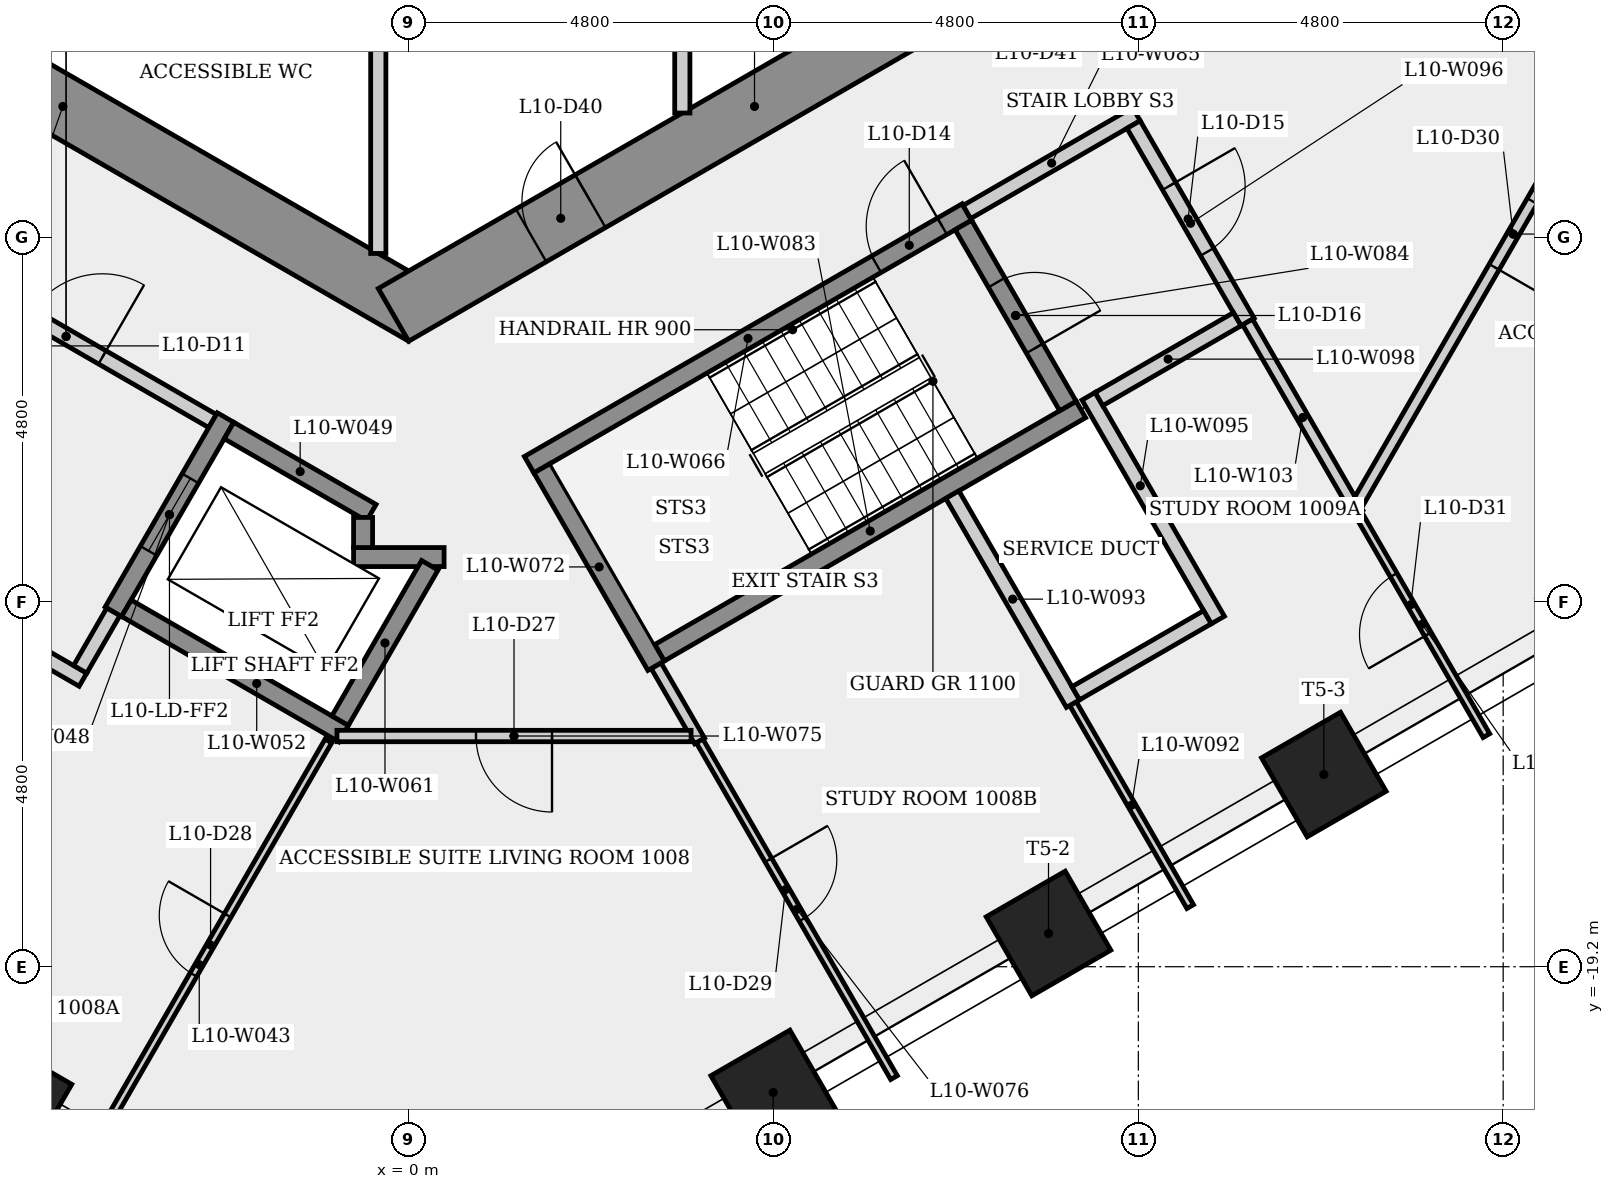
"""IFC4 building model, lengths in metres.
Left out: names, types, materials, properties, quantities, classifications, styles, units other than length and angle.
Written with IfcOpenShell. Run it as: python <this file> out.ifc"""

import sys

from ifc_helpers import new_model, si_unit, direction, frame, frame_2d, origin, origin_2d, place, context, subcontext, project, spatial, rectangle, extrude, element, fill, save


model = new_model("IFC4")
c1 = context("Model", 3, precision=1e-05, world=origin(), true_north=direction((0.0, 1.0)))
c2 = subcontext(c1, "Body", "Model", "MODEL_VIEW")
j1 = project(units=[si_unit("LENGTHUNIT", "METRE"), si_unit("PLANEANGLEUNIT", "RADIAN")], contexts=[c1])
p1 = place(None, origin())
s1 = spatial("IfcSite", under=j1, at=p1, CompositionType="ELEMENT")
p2 = place(p1, origin())
s2 = spatial("IfcBuilding", under=s1, at=p2, CompositionType="ELEMENT")
p3 = place(p2, frame((0.0, 0.0, 42.5)))
s3 = spatial("IfcBuildingStorey", under=s2, at=p3, CompositionType="ELEMENT", Elevation=42.5)
p4 = place(p3, frame((-9.3, -5.138, 0.0), z_axis=(0.0, 0.0, 1.0), x_axis=(0.866023993627, -0.500002442456, 0.0)))
e1 = element("IfcWall", 1, at=p4, inside=s3, PredefinedType="SHEAR", context=c2, shape_type="SweptSolid", body=[
    extrude(rectangle(XDim=10.97, YDim=0.8, at=frame_2d((5.485, 0.0))), origin(), (0.0, 0.0, 1.0), 3.4),
])
p5 = place(p4, frame((3.192, 0.0, 0.0)))
e2 = element("IfcOpeningElement", 2, at=p5, cuts=e1, PredefinedType="OPENING", context=c2, shape_type="SweptSolid", body=[
    extrude(rectangle(XDim=0.9, YDim=2.1, at=frame_2d((0.45, 1.05))), frame((0.0, 0.41, 0.0), z_axis=(0.0, -1.0, 0.0), x_axis=(1.0, 0.0, 0.0)), (0.0, 0.0, 1.0), 0.82),
])
p6 = place(p3, frame((-0.2, -10.623, 0.0), z_axis=(0.0, 0.0, 1.0), x_axis=(0.866023993627, 0.500002442456, 0.0)))
e3 = element("IfcWall", 3, at=p6, inside=s3, PredefinedType="SHEAR", context=c2, shape_type="SweptSolid", body=[
    extrude(rectangle(XDim=10.97, YDim=0.8, at=frame_2d((5.485, 0.0))), origin(), (0.0, 0.0, 1.0), 3.4),
])
p7 = place(p6, frame((2.091, 0.0, 0.0)))
e4 = element("IfcOpeningElement", 4, at=p7, cuts=e3, PredefinedType="OPENING", context=c2, shape_type="SweptSolid", body=[
    extrude(rectangle(XDim=0.9, YDim=2.1, at=frame_2d((0.45, 1.05))), frame((0.0, 0.41, 0.0), z_axis=(0.0, -1.0, 0.0), x_axis=(1.0, 0.0, 0.0)), (0.0, 0.0, 1.0), 0.82),
])
p8 = place(p6, frame((9.325, 0.0, 0.0)))
e5 = element("IfcOpeningElement", 5, at=p8, cuts=e3, PredefinedType="OPENING", context=c2, shape_type="SweptSolid", body=[
    extrude(rectangle(XDim=0.9, YDim=2.1, at=frame_2d((0.45, 1.05))), frame((0.0, 0.41, 0.0), z_axis=(0.0, -1.0, 0.0), x_axis=(1.0, 0.0, 0.0)), (0.0, 0.0, 1.0), 0.82),
])
for number, where, z_axis, x_axis in (
    (6, (-5.253, -20.967, 0.0), (0.0, 0.0, 1.0), (-0.5, -0.866, 0.0)),
    (7, (4.796, -20.854, 0.0), (0.0, 0.0, 1.0), (0.5, -0.866, 0.0)),
    (8, (8.418, -18.763, 0.0), (0.0, 0.0, 1.0), (0.5, -0.866, 0.0)),
    (9, (12.04, -16.672, 0.0), (0.0, 0.0, 1.0), (0.5, -0.866, 0.0)),
):
    element("IfcColumn", number, at=place(p3, frame(where, z_axis=z_axis, x_axis=x_axis)), inside=s3, PredefinedType="COLUMN", context=c2, shape_type="SweptSolid", body=[
        extrude(rectangle(XDim=1.2, YDim=1.2, at=origin_2d()), origin(), (0.0, 0.0, 1.0), 3.4),
    ])
p9 = place(p3, frame((-8.356, -13.073, 0.0), z_axis=(0.0, 0.0, 1.0), x_axis=(0.866038532462, -0.499977259774, 0.0)))
e10 = element("IfcWall", 10, at=p9, inside=s3, PredefinedType="PARTITIONING", context=c2, shape_type="SweptSolid", body=[
    extrude(rectangle(XDim=4.7, YDim=0.2, at=frame_2d((2.35, 0.0))), origin(), (0.0, 0.0, 1.0), 3.05),
])
p10 = place(p3, frame((-6.435, -9.795, 0.0), z_axis=(0.0, 0.0, 1.0), x_axis=(0.866012907634, -0.500021643343, 0.0)))
e11 = element("IfcWall", 11, at=p10, inside=s3, PredefinedType="PARTITIONING", context=c2, shape_type="SweptSolid", body=[
    extrude(rectangle(XDim=4.45, YDim=0.2, at=frame_2d((2.225, 0.0))), origin(), (0.0, 0.0, 1.0), 3.05),
])
p11 = place(p10, frame((1.675, 0.0, 0.0)))
e12 = element("IfcOpeningElement", 12, at=p11, cuts=e11, PredefinedType="OPENING", context=c2, shape_type="SweptSolid", body=[
    extrude(rectangle(XDim=1.1, YDim=2.1, at=frame_2d((0.55, 1.05))), frame((0.0, 0.11, 0.0), z_axis=(0.0, -1.0, 0.0), x_axis=(1.0, 0.0, 0.0)), (0.0, 0.0, 1.0), 0.22),
])
p12 = place(p3, frame((-4.455, -22.116, 0.0), z_axis=(0.0, 0.0, 1.0), x_axis=(0.499971184285, 0.866042039906, 0.0)))
e13 = element("IfcWall", 13, at=p12, inside=s3, PredefinedType="PARTITIONING", context=c2, shape_type="SweptSolid", body=[
    extrude(rectangle(XDim=6.797, YDim=0.1, at=frame_2d((3.399, 0.0))), origin(), (0.0, 0.0, 1.0), 3.05),
])
p13 = place(p12, frame((3.247, 0.0, 0.0)))
e14 = element("IfcOpeningElement", 14, at=p13, cuts=e13, PredefinedType="OPENING", context=c2, shape_type="SweptSolid", body=[
    extrude(rectangle(XDim=0.9, YDim=2.1, at=frame_2d((0.45, 1.05))), frame((0.0, 0.06, 0.0), z_axis=(0.0, -1.0, 0.0), x_axis=(1.0, 0.0, 0.0)), (0.0, 0.0, 1.0), 0.12),
])
p14 = place(p3, frame((-3.885, -14.529, 0.0), z_axis=(0.0, 0.0, 1.0), x_axis=(-0.499859285417, -0.866106630146, 0.0)))
e15 = element("IfcWall", 15, at=p14, inside=s3, PredefinedType="PARTITIONING", context=c2, shape_type="SweptSolid", body=[
    extrude(rectangle(XDim=0.875, YDim=0.2, at=frame_2d((0.438, 0.0))), origin(), (0.0, 0.0, 1.0), 3.05),
])
p15 = place(p3, frame((-2.41, -11.974, 0.0), z_axis=(0.0, 0.0, 1.0), x_axis=(-0.500001826776, -0.866024349092, 0.0)))
e16 = element("IfcWall", 16, at=p15, inside=s3, PredefinedType="SHEAR", context=c2, shape_type="SweptSolid", body=[
    extrude(rectangle(XDim=2.95, YDim=0.25, at=frame_2d((1.475, 0.0))), origin(), (0.0, 0.0, 1.0), 3.05),
])
p16 = place(p15, frame((0.925, 0.0, 0.0)))
e17 = element("IfcOpeningElement", 17, at=p16, cuts=e16, PredefinedType="OPENING", context=c2, shape_type="SweptSolid", body=[
    extrude(rectangle(XDim=1.1, YDim=2.1, at=frame_2d((0.55, 1.05))), frame((0.0, 0.135, 0.0), z_axis=(0.0, -1.0, 0.0), x_axis=(1.0, 0.0, 0.0)), (0.0, 0.0, 1.0), 0.27),
])
p17 = place(p3, frame((-2.364, -12.145, 0.0), z_axis=(0.0, 0.0, 1.0), x_axis=(0.86603892542, -0.499976579108, 0.0)))
e18 = element("IfcWall", 18, at=p17, inside=s3, PredefinedType="SHEAR", context=c2, shape_type="SweptSolid", body=[
    extrude(rectangle(XDim=2.162, YDim=0.25, at=frame_2d((1.081, 0.0))), origin(), (0.0, 0.0, 1.0), 3.05),
])
p18 = place(p3, frame((-0.856, -16.133, 0.0), z_axis=(0.0, 0.0, 1.0), x_axis=(-0.866021716278, 0.500006386895, 0.0)))
e19 = element("IfcWall", 19, at=p18, inside=s3, PredefinedType="SHEAR", context=c2, shape_type="SweptSolid", body=[
    extrude(rectangle(XDim=3.3, YDim=0.25, at=frame_2d((1.65, 0.0))), origin(), (0.0, 0.0, 1.0), 3.05),
])
p19 = place(p3, frame((-0.725, -13.81, 0.0), z_axis=(0.0, 0.0, 1.0), x_axis=(1.0, 0.0, 0.0)))
e20 = element("IfcWall", 20, at=p19, inside=s3, PredefinedType="SHEAR", context=c2, shape_type="SweptSolid", body=[
    extrude(rectangle(XDim=1.191, YDim=0.25, at=frame_2d((0.595, 0.0))), origin(), (0.0, 0.0, 1.0), 3.05),
])
p20 = place(p3, frame((-0.6, -13.289, 0.0), z_axis=(0.0, 0.0, 1.0), x_axis=(0.0, -1.0, 0.0)))
e21 = element("IfcWall", 21, at=p20, inside=s3, PredefinedType="SHEAR", context=c2, shape_type="SweptSolid", body=[
    extrude(rectangle(XDim=0.396, YDim=0.25, at=frame_2d((0.198, 0.0))), origin(), (0.0, 0.0, 1.0), 3.4),
])
p21 = place(p3, frame((-0.4, -5.275, 0.0), z_axis=(0.0, 0.0, 1.0), x_axis=(0.0, -1.0, 0.0)))
e22 = element("IfcWall", 22, at=p21, inside=s3, PredefinedType="PARTITIONING", context=c2, shape_type="SweptSolid", body=[
    extrude(rectangle(XDim=4.54, YDim=0.2, at=frame_2d((2.27, 0.0))), origin(), (0.0, 0.0, 1.0), 3.05),
])
p22 = place(p3, frame((0.278, -13.918, 0.0), z_axis=(0.0, 0.0, 1.0), x_axis=(-0.49998806882, -0.866032292145, 0.0)))
e23 = element("IfcWall", 23, at=p22, inside=s3, PredefinedType="SHEAR", context=c2, shape_type="SweptSolid", body=[
    extrude(rectangle(XDim=2.36, YDim=0.25, at=frame_2d((1.18, 0.0))), origin(), (0.0, 0.0, 1.0), 3.4),
])
p23 = place(p3, frame((1.585, -12.595, 0.0), z_axis=(0.0, 0.0, 1.0), x_axis=(0.866036417653, 0.499980922934, 0.0)))
e24 = element("IfcWall", 24, at=p23, inside=s3, PredefinedType="SHEAR", context=c2, shape_type="SweptSolid", body=[
    extrude(rectangle(XDim=6.65, YDim=0.25, at=frame_2d((3.325, 0.0))), origin(), (0.0, 0.0, 1.0), 3.05),
])
p24 = place(p23, frame((5.275, 0.0, 0.0)))
e25 = element("IfcOpeningElement", 25, at=p24, cuts=e24, PredefinedType="OPENING", context=c2, shape_type="SweptSolid", body=[
    extrude(rectangle(XDim=1.0, YDim=2.1, at=frame_2d((0.5, 1.05))), frame((0.0, 0.135, 0.0), z_axis=(0.0, -1.0, 0.0), x_axis=(1.0, 0.0, 0.0)), (0.0, 0.0, 1.0), 0.27),
])
p25 = place(p3, frame((3.256, -15.239, 0.0), z_axis=(0.0, 0.0, 1.0), x_axis=(0.500018023529, -0.866014997645, 0.0)))
e26 = element("IfcWall", 26, at=p25, inside=s3, PredefinedType="PARTITIONING", context=c2, shape_type="SweptSolid", body=[
    extrude(rectangle(XDim=1.144, YDim=0.15, at=frame_2d((0.572, 0.0))), origin(), (0.0, 0.0, 1.0), 3.05),
])
p26 = place(p3, frame((3.256, -15.239, 0.0), z_axis=(0.0, 0.0, 1.0), x_axis=(-0.50002537861, 0.866010750942, 0.0)))
e27 = element("IfcWall", 27, at=p26, inside=s3, PredefinedType="SHEAR", context=c2, shape_type="SweptSolid", body=[
    extrude(rectangle(XDim=3.0, YDim=0.25, at=frame_2d((1.5, 0.0))), origin(), (0.0, 0.0, 1.0), 3.05),
])
p27 = place(p3, frame((3.6, -5.275, 0.0), z_axis=(0.0, 0.0, 1.0), x_axis=(0.0, -1.0, 0.0)))
e28 = element("IfcWall", 28, at=p27, inside=s3, PredefinedType="PARTITIONING", context=c2, shape_type="SweptSolid", body=[
    extrude(rectangle(XDim=2.692, YDim=0.2, at=frame_2d((1.346, 0.0))), origin(), (0.0, 0.0, 1.0), 3.05),
])
p28 = place(p3, frame((3.715, -16.165, 0.0), z_axis=(0.0, 0.0, 1.0), x_axis=(-1.0, 0.0, 0.0)))
e29 = element("IfcWall", 29, at=p28, inside=s3, PredefinedType="PARTITIONING", context=c2, shape_type="SweptSolid", body=[
    extrude(rectangle(XDim=4.659, YDim=0.15, at=frame_2d((2.33, 0.0))), origin(), (0.0, 0.0, 1.0), 3.05),
])
p29 = place(p28, frame((1.829, 0.0, 0.0)))
e30 = element("IfcOpeningElement", 30, at=p29, cuts=e29, PredefinedType="OPENING", context=c2, shape_type="SweptSolid", body=[
    extrude(rectangle(XDim=1.0, YDim=2.1, at=frame_2d((0.5, 1.05))), frame((0.0, 0.085, 0.0), z_axis=(0.0, -1.0, 0.0), x_axis=(1.0, 0.0, 0.0)), (0.0, 0.0, 1.0), 0.17),
])
p30 = place(p3, frame((3.828, -16.229, 0.0), z_axis=(0.0, 0.0, 1.0), x_axis=(0.499984131058, -0.866034565529, 0.0)))
e31 = element("IfcWall", 31, at=p30, inside=s3, PredefinedType="PARTITIONING", context=c2, shape_type="SweptSolid", body=[
    extrude(rectangle(XDim=5.115, YDim=0.1, at=frame_2d((2.558, 0.0))), origin(), (0.0, 0.0, 1.0), 3.05),
])
p31 = place(p30, frame((1.81, 0.0, 0.0)))
e32 = element("IfcOpeningElement", 32, at=p31, cuts=e31, PredefinedType="OPENING", context=c2, shape_type="SweptSolid", body=[
    extrude(rectangle(XDim=0.9, YDim=2.1, at=frame_2d((0.45, 1.05))), frame((0.0, 0.06, 0.0), z_axis=(0.0, -1.0, 0.0), x_axis=(1.0, 0.0, 0.0)), (0.0, 0.0, 1.0), 0.12),
])
p32 = place(p3, frame((3.301, -15.068, 0.0), z_axis=(0.0, 0.0, 1.0), x_axis=(0.866035036182, 0.499983315828, 0.0)))
e33 = element("IfcWall", 33, at=p32, inside=s3, PredefinedType="SHEAR", context=c2, shape_type="SweptSolid", body=[
    extrude(rectangle(XDim=6.4, YDim=0.25, at=frame_2d((3.2, 0.0))), origin(), (0.0, 0.0, 1.0), 3.05),
])
p33 = place(p3, frame((7.298, -9.441, 0.0), z_axis=(0.0, 0.0, 1.0), x_axis=(0.500034990121, -0.866005201286, 0.0)))
e34 = element("IfcWall", 34, at=p33, inside=s3, PredefinedType="SHEAR", context=c2, shape_type="SweptSolid", body=[
    extrude(rectangle(XDim=2.75, YDim=0.25, at=frame_2d((1.375, 0.0))), origin(), (0.0, 0.0, 1.0), 3.05),
])
p34 = place(p33, frame((0.875, 0.0, 0.0)))
e35 = element("IfcOpeningElement", 35, at=p34, cuts=e34, PredefinedType="OPENING", context=c2, shape_type="SweptSolid", body=[
    extrude(rectangle(XDim=1.0, YDim=2.1, at=frame_2d((0.5, 1.05))), frame((0.0, 0.135, 0.0), z_axis=(0.0, -1.0, 0.0), x_axis=(1.0, 0.0, 0.0)), (0.0, 0.0, 1.0), 0.27),
])
p35 = place(p3, frame((7.344, -9.27, 0.0), z_axis=(0.0, 0.0, 1.0), x_axis=(0.866005588531, 0.500034319456, 0.0)))
e36 = element("IfcWall", 36, at=p35, inside=s3, PredefinedType="PARTITIONING", context=c2, shape_type="SweptSolid", body=[
    extrude(rectangle(XDim=2.575, YDim=0.2, at=frame_2d((1.288, 0.0))), origin(), (0.0, 0.0, 1.0), 3.05),
])
p36 = place(p3, frame((8.74, -15.738, 0.0), z_axis=(0.0, 0.0, 1.0), x_axis=(0.499987416453, -0.866032668777, 0.0)))
e37 = element("IfcWall", 37, at=p36, inside=s3, PredefinedType="PARTITIONING", context=c2, shape_type="SweptSolid", body=[
    extrude(rectangle(XDim=3.084, YDim=0.1, at=frame_2d((1.542, 0.0))), origin(), (0.0, 0.0, 1.0), 3.05),
])
p37 = place(p3, frame((8.74, -15.739, 0.0), z_axis=(0.0, 0.0, 1.0), x_axis=(-0.500017526161, 0.866015284814, 0.0)))
e38 = element("IfcWall", 38, at=p37, inside=s3, PredefinedType="PLUMBINGWALL", context=c2, shape_type="SweptSolid", body=[
    extrude(rectangle(XDim=3.175, YDim=0.2, at=frame_2d((1.588, 0.0))), origin(), (0.0, 0.0, 1.0), 3.05),
])
p38 = place(p3, frame((8.945, -11.694, 0.0), z_axis=(0.0, 0.0, 1.0), x_axis=(0.500062241894, -0.865989465428, 0.0)))
e39 = element("IfcWall", 39, at=p38, inside=s3, PredefinedType="PLUMBINGWALL", context=c2, shape_type="SweptSolid", body=[
    extrude(rectangle(XDim=3.4, YDim=0.2, at=frame_2d((1.7, 0.0))), origin(), (0.0, 0.0, 1.0), 3.05),
])
p39 = place(p3, frame((9.537, -8.119, 0.0), z_axis=(0.0, 0.0, 1.0), x_axis=(0.499990139034, -0.866031096941, 0.0)))
e40 = element("IfcWall", 40, at=p39, inside=s3, PredefinedType="PARTITIONING", context=c2, shape_type="SweptSolid", body=[
    extrude(rectangle(XDim=3.0, YDim=0.2, at=frame_2d((1.5, 0.0))), origin(), (0.0, 0.0, 1.0), 3.05),
])
p40 = place(p39, frame((0.935, 0.0, 0.0)))
e41 = element("IfcOpeningElement", 41, at=p40, cuts=e40, PredefinedType="OPENING", context=c2, shape_type="SweptSolid", body=[
    extrude(rectangle(XDim=1.0, YDim=2.1, at=frame_2d((0.5, 1.05))), frame((0.0, 0.11, 0.0), z_axis=(0.0, -1.0, 0.0), x_axis=(1.0, 0.0, 0.0)), (0.0, 0.0, 1.0), 0.22),
])
p41 = place(p3, frame((10.509, -14.602, 0.0), z_axis=(0.0, 0.0, 1.0), x_axis=(-0.866010750942, -0.50002537861, 0.0)))
e42 = element("IfcWall", 42, at=p41, inside=s3, PredefinedType="PLUMBINGWALL", context=c2, shape_type="SweptSolid", body=[
    extrude(rectangle(XDim=2.0, YDim=0.2, at=frame_2d((1.0, 0.0))), origin(), (0.0, 0.0, 1.0), 3.05),
])
p42 = place(p3, frame((10.901, -10.681, 0.0), z_axis=(0.0, 0.0, 1.0), x_axis=(-0.866009402589, -0.500027713859, 0.0)))
e43 = element("IfcWall", 43, at=p42, inside=s3, PredefinedType="PARTITIONING", context=c2, shape_type="SweptSolid", body=[
    extrude(rectangle(XDim=2.1, YDim=0.2, at=frame_2d((1.05, 0.0))), origin(), (0.0, 0.0, 1.0), 3.05),
])
p43 = place(p3, frame((12.488, -13.229, 0.0), z_axis=(0.0, 0.0, 1.0), x_axis=(-0.499967707918, 0.866044046824, 0.0)))
e44 = element("IfcWall", 44, at=p43, inside=s3, PredefinedType="PARTITIONING", context=c2, shape_type="SweptSolid", body=[
    extrude(rectangle(XDim=2.901, YDim=0.15, at=frame_2d((1.451, 0.0))), origin(), (0.0, 0.0, 1.0), 3.05),
])
p44 = place(p3, frame((14.179, -16.159, 0.0), z_axis=(0.0, 0.0, 1.0), x_axis=(-0.499988999718, 0.866031754707, 0.0)))
e45 = element("IfcWall", 45, at=p44, inside=s3, PredefinedType="PARTITIONING", context=c2, shape_type="SweptSolid", body=[
    extrude(rectangle(XDim=3.383, YDim=0.1, at=frame_2d((1.691, 0.0))), origin(), (0.0, 0.0, 1.0), 3.05),
])
p45 = place(p44, frame((1.539, 0.0, 0.0)))
e46 = element("IfcOpeningElement", 46, at=p45, cuts=e45, PredefinedType="OPENING", context=c2, shape_type="SweptSolid", body=[
    extrude(rectangle(XDim=0.9, YDim=2.1, at=frame_2d((0.45, 1.05))), frame((0.0, 0.06, 0.0), z_axis=(0.0, -1.0, 0.0), x_axis=(1.0, 0.0, 0.0)), (0.0, 0.0, 1.0), 0.12),
])
p46 = place(p3, frame((16.575, -6.02, 0.0), z_axis=(0.0, 0.0, 1.0), x_axis=(-0.49999993043, -0.86602544395, 0.0)))
e47 = element("IfcWall", 47, at=p46, inside=s3, PredefinedType="PARTITIONING", context=c2, shape_type="SweptSolid", body=[
    extrude(rectangle(XDim=8.175, YDim=0.15, at=frame_2d((4.087, 0.0))), origin(), (0.0, 0.0, 1.0), 3.05),
])
p47 = place(p46, frame((3.587, 0.0, 0.0)))
e48 = element("IfcOpeningElement", 48, at=p47, cuts=e47, PredefinedType="OPENING", context=c2, shape_type="SweptSolid", body=[
    extrude(rectangle(XDim=1.0, YDim=2.1, at=frame_2d((0.5, 1.05))), frame((0.0, 0.085, 0.0), z_axis=(0.0, -1.0, 0.0), x_axis=(1.0, 0.0, 0.0)), (0.0, 0.0, 1.0), 0.17),
])
p48 = place(p11, origin())
e49 = element("IfcDoor", 49, at=p48, inside=s3, OperationType="SINGLE_SWING_RIGHT", PredefinedType="DOOR", context=c2, shape_type="SweptSolid", body=[
    extrude(rectangle(XDim=1.1, YDim=2.1, at=frame_2d((0.55, 1.05))), frame((0.0, 0.025, 0.0), z_axis=(0.0, -1.0, 0.0), x_axis=(1.0, 0.0, 0.0)), (0.0, 0.0, 1.0), 0.05),
])
fill(e12, e49)
p49 = place(p16, origin())
e50 = element("IfcDoor", 50, at=p49, inside=s3, OperationType="SLIDING_TO_LEFT", PredefinedType="DOOR", context=c2, shape_type="SweptSolid", body=[
    extrude(rectangle(XDim=1.1, YDim=2.1, at=frame_2d((0.55, 1.05))), frame((0.0, 0.025, 0.0), z_axis=(0.0, -1.0, 0.0), x_axis=(1.0, 0.0, 0.0)), (0.0, 0.0, 1.0), 0.05),
])
fill(e17, e50)
p50 = place(p24, origin())
e51 = element("IfcDoor", 51, at=p50, inside=s3, OperationType="SINGLE_SWING_RIGHT", PredefinedType="DOOR", context=c2, shape_type="SweptSolid", body=[
    extrude(rectangle(XDim=1.0, YDim=2.1, at=frame_2d((0.5, 1.05))), frame((0.0, 0.025, 0.0), z_axis=(0.0, -1.0, 0.0), x_axis=(1.0, 0.0, 0.0)), (0.0, 0.0, 1.0), 0.05),
])
fill(e25, e51)
p51 = place(p40, origin())
e52 = element("IfcDoor", 52, at=p51, inside=s3, OperationType="SINGLE_SWING_LEFT", PredefinedType="DOOR", context=c2, shape_type="SweptSolid", body=[
    extrude(rectangle(XDim=1.0, YDim=2.1, at=frame_2d((0.5, 1.05))), frame((0.0, 0.025, 0.0), z_axis=(0.0, -1.0, 0.0), x_axis=(1.0, 0.0, 0.0)), (0.0, 0.0, 1.0), 0.05),
])
fill(e41, e52)
p52 = place(p34, origin())
e53 = element("IfcDoor", 53, at=p52, inside=s3, OperationType="SINGLE_SWING_RIGHT", PredefinedType="DOOR", context=c2, shape_type="SweptSolid", body=[
    extrude(rectangle(XDim=1.0, YDim=2.1, at=frame_2d((0.5, 1.05))), frame((0.0, 0.025, 0.0), z_axis=(0.0, -1.0, 0.0), x_axis=(1.0, 0.0, 0.0)), (0.0, 0.0, 1.0), 0.05),
])
fill(e35, e53)
p53 = place(p29, origin())
e54 = element("IfcDoor", 54, at=p53, inside=s3, OperationType="SINGLE_SWING_LEFT", PredefinedType="DOOR", context=c2, shape_type="SweptSolid", body=[
    extrude(rectangle(XDim=1.0, YDim=2.1, at=frame_2d((0.5, 1.05))), frame((0.0, 0.025, 0.0), z_axis=(0.0, -1.0, 0.0), x_axis=(1.0, 0.0, 0.0)), (0.0, 0.0, 1.0), 0.05),
])
fill(e30, e54)
p54 = place(p13, origin())
e55 = element("IfcDoor", 55, at=p54, inside=s3, OperationType="SINGLE_SWING_RIGHT", PredefinedType="DOOR", context=c2, shape_type="SweptSolid", body=[
    extrude(rectangle(XDim=0.9, YDim=2.1, at=frame_2d((0.45, 1.05))), frame((0.0, 0.025, 0.0), z_axis=(0.0, -1.0, 0.0), x_axis=(1.0, 0.0, 0.0)), (0.0, 0.0, 1.0), 0.05),
])
fill(e14, e55)
p55 = place(p31, origin())
e56 = element("IfcDoor", 56, at=p55, inside=s3, OperationType="SINGLE_SWING_LEFT", PredefinedType="DOOR", context=c2, shape_type="SweptSolid", body=[
    extrude(rectangle(XDim=0.9, YDim=2.1, at=frame_2d((0.45, 1.05))), frame((0.0, 0.025, 0.0), z_axis=(0.0, -1.0, 0.0), x_axis=(1.0, 0.0, 0.0)), (0.0, 0.0, 1.0), 0.05),
])
fill(e32, e56)
p56 = place(p47, origin())
e57 = element("IfcDoor", 57, at=p56, inside=s3, OperationType="SINGLE_SWING_RIGHT", PredefinedType="DOOR", context=c2, shape_type="SweptSolid", body=[
    extrude(rectangle(XDim=1.0, YDim=2.1, at=frame_2d((0.5, 1.05))), frame((0.0, 0.025, 0.0), z_axis=(0.0, -1.0, 0.0), x_axis=(1.0, 0.0, 0.0)), (0.0, 0.0, 1.0), 0.05),
])
fill(e48, e57)
p57 = place(p45, origin())
e58 = element("IfcDoor", 58, at=p57, inside=s3, OperationType="SINGLE_SWING_LEFT", PredefinedType="DOOR", context=c2, shape_type="SweptSolid", body=[
    extrude(rectangle(XDim=0.9, YDim=2.1, at=frame_2d((0.45, 1.05))), frame((0.0, 0.025, 0.0), z_axis=(0.0, -1.0, 0.0), x_axis=(1.0, 0.0, 0.0)), (0.0, 0.0, 1.0), 0.05),
])
fill(e46, e58)
p58 = place(p7, origin())
e59 = element("IfcDoor", 59, at=p58, inside=s3, OperationType="SINGLE_SWING_RIGHT", PredefinedType="DOOR", context=c2, shape_type="SweptSolid", body=[
    extrude(rectangle(XDim=0.9, YDim=2.1, at=frame_2d((0.45, 1.05))), frame((0.0, 0.025, 0.0), z_axis=(0.0, -1.0, 0.0), x_axis=(1.0, 0.0, 0.0)), (0.0, 0.0, 1.0), 0.05),
])
fill(e4, e59)
save(model, sys.argv[1])
